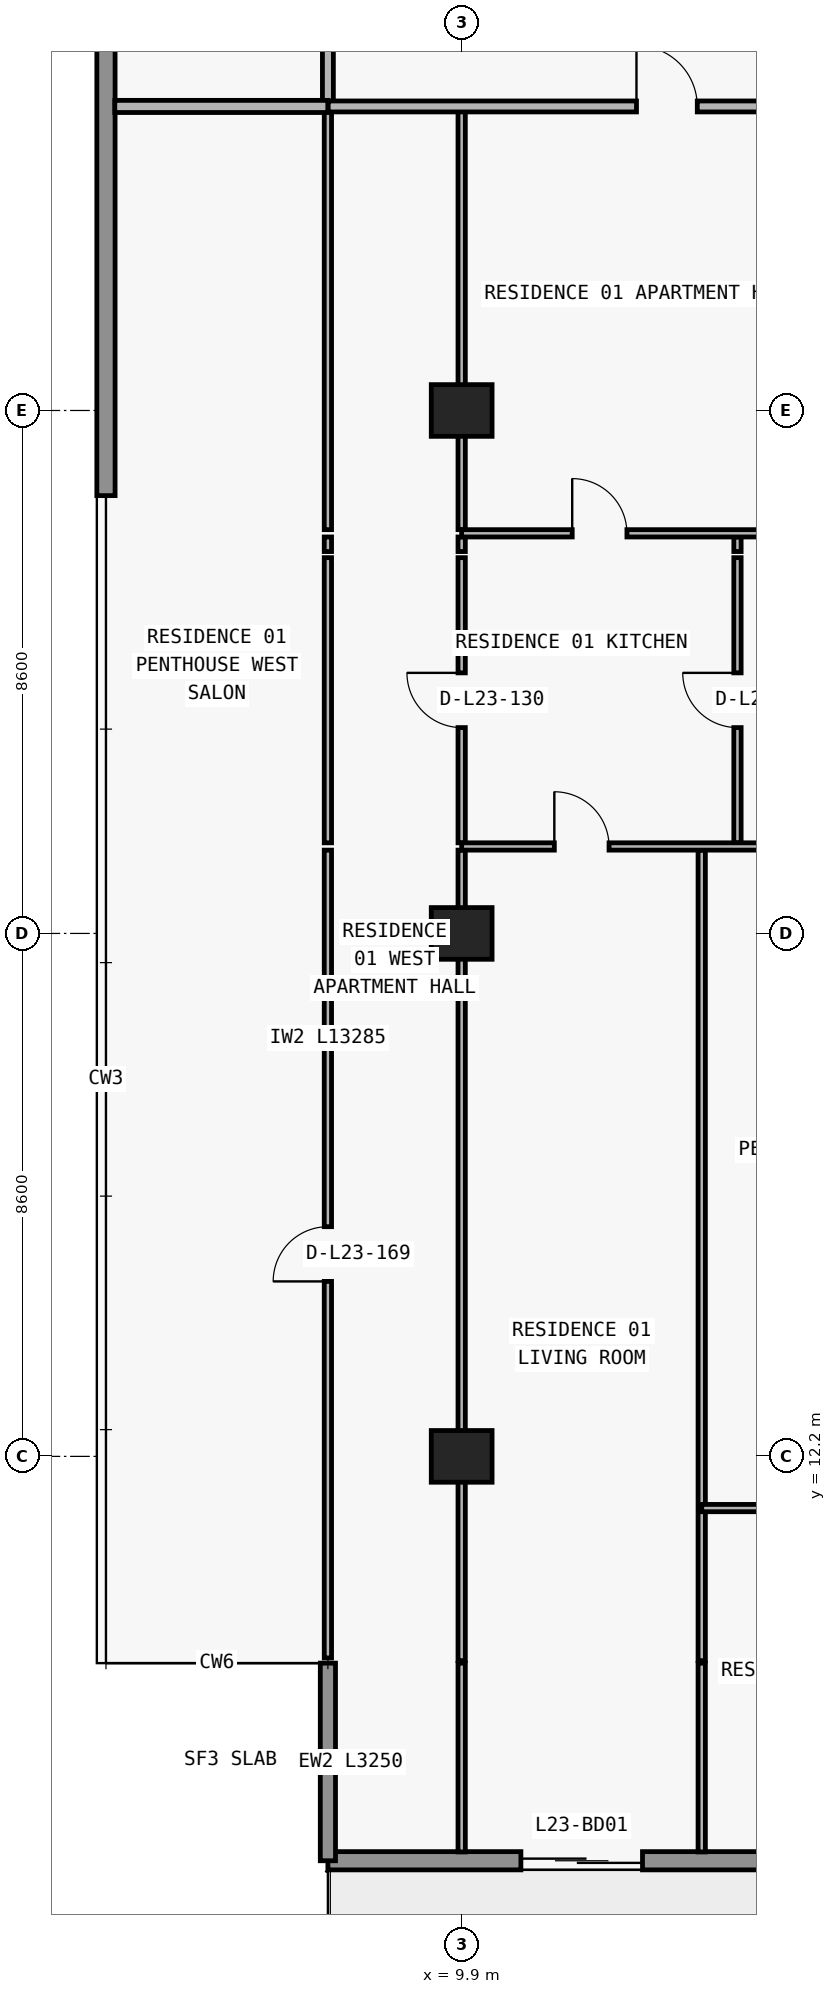
"""IFC4 building model, lengths in metres.
Left out: names, types, materials, properties, quantities, classifications, styles, units other than length and angle.
Written with IfcOpenShell. Run it as: python <this file> out.ifc"""

import sys

from ifc_helpers import new_model, si_unit, direction, frame, frame_2d, origin, origin_2d, place, context, subcontext, project, spatial, rectangle, extrude, element, fill, save


model = new_model("IFC4")
c1 = context("Model", 3, precision=1e-05, world=origin(), true_north=direction((0.0, 1.0)))
c2 = subcontext(c1, "Body", "Model", "MODEL_VIEW")
j1 = project(units=[si_unit("LENGTHUNIT", "METRE"), si_unit("PLANEANGLEUNIT", "RADIAN")], contexts=[c1])
p1 = place(None, origin())
s1 = spatial("IfcSite", under=j1, at=p1, CompositionType="ELEMENT")
p2 = place(p1, origin())
s2 = spatial("IfcBuilding", under=s1, at=p2, CompositionType="ELEMENT")
p3 = place(p2, frame((0.0, 0.0, 87.9)))
s3 = spatial("IfcBuildingStorey", under=s2, at=p3, CompositionType="ELEMENT", Elevation=87.9)
for number, where, z_axis, x_axis in (
    (1, (9.9, 12.2, 0.0), (0.0, 0.0, 1.0), (1.0, 0.0, 0.0)),
    (2, (9.9, 20.8, 0.0), (0.0, 0.0, 1.0), (1.0, 0.0, 0.0)),
    (3, (9.9, 29.4, 0.0), (0.0, 0.0, 1.0), (1.0, 0.0, 0.0)),
):
    element("IfcColumn", number, at=place(p3, frame(where, z_axis=z_axis, x_axis=x_axis)), inside=s3, PredefinedType="COLUMN", context=c2, shape_type="SweptSolid", body=[
        extrude(rectangle(XDim=1.0, YDim=0.85, at=origin_2d()), origin(), (0.0, 0.0, 1.0), 3.05),
    ])
p4 = place(p3, frame((70.1, 5.55, 0.0), z_axis=(0.0, 0.0, 1.0), x_axis=(-1.0, 0.0, 0.0)))
e4 = element("IfcWall", 4, at=p4, inside=s3, PredefinedType="STANDARD", context=c2, shape_type="SweptSolid", body=[
    extrude(rectangle(XDim=62.4, YDim=0.3, at=frame_2d((31.2, 0.0))), origin(), (0.0, 0.0, 1.0), 3.05),
])
p5 = place(p4, frame((57.226, 0.0, 0.0)))
e5 = element("IfcOpeningElement", 5, at=p5, cuts=e4, PredefinedType="OPENING", context=c2, shape_type="SweptSolid", body=[
    extrude(rectangle(XDim=2.0, YDim=2.3, at=frame_2d((1.0, 1.15))), frame((0.0, 0.16, 0.0), z_axis=(0.0, -1.0, 0.0), x_axis=(1.0, 0.0, 0.0)), (0.0, 0.0, 1.0), 0.32),
])
p6 = place(p4, frame((52.926, 0.0, 0.85)))
e6 = element("IfcOpeningElement", 6, at=p6, cuts=e4, PredefinedType="OPENING", context=c2, shape_type="SweptSolid", body=[
    extrude(rectangle(XDim=2.2, YDim=1.55, at=frame_2d((1.1, 0.775))), frame((0.0, 0.16, 0.0), z_axis=(0.0, -1.0, 0.0), x_axis=(1.0, 0.0, 0.0)), (0.0, 0.0, 1.0), 0.32),
])
p7 = place(p4, frame((48.49, 0.0, 0.0)))
e7 = element("IfcOpeningElement", 7, at=p7, cuts=e4, PredefinedType="OPENING", context=c2, shape_type="SweptSolid", body=[
    extrude(rectangle(XDim=2.0, YDim=2.3, at=frame_2d((1.0, 1.15))), frame((0.0, 0.16, 0.0), z_axis=(0.0, -1.0, 0.0), x_axis=(1.0, 0.0, 0.0)), (0.0, 0.0, 1.0), 0.32),
])
p8 = place(p4, frame((44.39, 0.0, 0.85)))
e8 = element("IfcOpeningElement", 8, at=p8, cuts=e4, PredefinedType="OPENING", context=c2, shape_type="SweptSolid", body=[
    extrude(rectangle(XDim=1.8, YDim=1.55, at=frame_2d((0.9, 0.775))), frame((0.0, 0.16, 0.0), z_axis=(0.0, -1.0, 0.0), x_axis=(1.0, 0.0, 0.0)), (0.0, 0.0, 1.0), 0.32),
])
p9 = place(p4, frame((40.426, 0.0, 0.0)))
e9 = element("IfcOpeningElement", 9, at=p9, cuts=e4, PredefinedType="OPENING", context=c2, shape_type="SweptSolid", body=[
    extrude(rectangle(XDim=2.0, YDim=2.3, at=frame_2d((1.0, 1.15))), frame((0.0, 0.16, 0.0), z_axis=(0.0, -1.0, 0.0), x_axis=(1.0, 0.0, 0.0)), (0.0, 0.0, 1.0), 0.32),
])
p10 = place(p4, frame((36.126, 0.0, 0.85)))
e10 = element("IfcOpeningElement", 10, at=p10, cuts=e4, PredefinedType="OPENING", context=c2, shape_type="SweptSolid", body=[
    extrude(rectangle(XDim=2.2, YDim=1.55, at=frame_2d((1.1, 0.775))), frame((0.0, 0.16, 0.0), z_axis=(0.0, -1.0, 0.0), x_axis=(1.0, 0.0, 0.0)), (0.0, 0.0, 1.0), 0.32),
])
p11 = place(p4, frame((32.09, 0.0, 0.0)))
e11 = element("IfcOpeningElement", 11, at=p11, cuts=e4, PredefinedType="OPENING", context=c2, shape_type="SweptSolid", body=[
    extrude(rectangle(XDim=2.0, YDim=2.3, at=frame_2d((1.0, 1.15))), frame((0.0, 0.16, 0.0), z_axis=(0.0, -1.0, 0.0), x_axis=(1.0, 0.0, 0.0)), (0.0, 0.0, 1.0), 0.32),
])
p12 = place(p4, frame((28.21, 0.0, 0.65)))
e12 = element("IfcOpeningElement", 12, at=p12, cuts=e4, PredefinedType="OPENING", context=c2, shape_type="SweptSolid", body=[
    extrude(rectangle(XDim=2.6, YDim=1.85, at=frame_2d((1.3, 0.925))), frame((0.0, 0.16, 0.0), z_axis=(0.0, -1.0, 0.0), x_axis=(1.0, 0.0, 0.0)), (0.0, 0.0, 1.0), 0.32),
])
p13 = place(p4, frame((22.1, 0.0, 0.85)))
e13 = element("IfcOpeningElement", 13, at=p13, cuts=e4, PredefinedType="OPENING", context=c2, shape_type="SweptSolid", body=[
    extrude(rectangle(XDim=2.2, YDim=1.55, at=frame_2d((1.1, 0.775))), frame((0.0, 0.16, 0.0), z_axis=(0.0, -1.0, 0.0), x_axis=(1.0, 0.0, 0.0)), (0.0, 0.0, 1.0), 0.32),
])
p14 = place(p4, frame((16.026, 0.0, 0.0)))
e14 = element("IfcOpeningElement", 14, at=p14, cuts=e4, PredefinedType="OPENING", context=c2, shape_type="SweptSolid", body=[
    extrude(rectangle(XDim=2.0, YDim=2.3, at=frame_2d((1.0, 1.15))), frame((0.0, 0.16, 0.0), z_axis=(0.0, -1.0, 0.0), x_axis=(1.0, 0.0, 0.0)), (0.0, 0.0, 1.0), 0.32),
])
p15 = place(p4, frame((11.726, 0.0, 0.85)))
e15 = element("IfcOpeningElement", 15, at=p15, cuts=e4, PredefinedType="OPENING", context=c2, shape_type="SweptSolid", body=[
    extrude(rectangle(XDim=2.2, YDim=1.55, at=frame_2d((1.1, 0.775))), frame((0.0, 0.16, 0.0), z_axis=(0.0, -1.0, 0.0), x_axis=(1.0, 0.0, 0.0)), (0.0, 0.0, 1.0), 0.32),
])
p16 = place(p4, frame((7.29, 0.0, 0.0)))
e16 = element("IfcOpeningElement", 16, at=p16, cuts=e4, PredefinedType="OPENING", context=c2, shape_type="SweptSolid", body=[
    extrude(rectangle(XDim=2.0, YDim=2.3, at=frame_2d((1.0, 1.15))), frame((0.0, 0.16, 0.0), z_axis=(0.0, -1.0, 0.0), x_axis=(1.0, 0.0, 0.0)), (0.0, 0.0, 1.0), 0.32),
])
p17 = place(p4, frame((3.19, 0.0, 0.85)))
e17 = element("IfcOpeningElement", 17, at=p17, cuts=e4, PredefinedType="OPENING", context=c2, shape_type="SweptSolid", body=[
    extrude(rectangle(XDim=1.8, YDim=1.55, at=frame_2d((0.9, 0.775))), frame((0.0, 0.16, 0.0), z_axis=(0.0, -1.0, 0.0), x_axis=(1.0, 0.0, 0.0)), (0.0, 0.0, 1.0), 0.32),
])
p18 = place(p3, frame((7.7, 8.8, 0.0), z_axis=(0.0, 0.0, 1.0), x_axis=(0.0, -1.0, 0.0)))
e18 = element("IfcWall", 18, at=p18, inside=s3, PredefinedType="ELEMENTEDWALL", context=c2, shape_type="SweptSolid", body=[
    extrude(rectangle(XDim=3.25, YDim=0.25, at=frame_2d((1.625, 0.0))), origin(), (0.0, 0.0, 1.0), 3.05),
])
p19 = place(p3, frame((4.05, 28.0, 0.0), z_axis=(0.0, 0.0, 1.0), x_axis=(0.0, 1.0, 0.0)))
e19 = element("IfcWall", 19, at=p19, inside=s3, PredefinedType="STANDARD", context=c2, shape_type="SweptSolid", body=[
    extrude(rectangle(XDim=19.2, YDim=0.3, at=frame_2d((9.6, 0.0))), origin(), (0.0, 0.0, 1.0), 3.05),
])
p20 = place(p3, frame((7.7, 8.885, 0.0), z_axis=(0.0, 0.0, 1.0), x_axis=(0.0, 1.0, 0.0)))
e20 = element("IfcWall", 20, at=p20, inside=s3, PredefinedType="PARTITIONING", context=c2, shape_type="SweptSolid", body=[
    extrude(rectangle(XDim=13.285, YDim=0.12, at=frame_2d((6.643, 0.0))), origin(), (0.0, 0.0, 1.0), 3.05),
])
p21 = place(p20, frame((6.192, 0.0, 0.0)))
e21 = element("IfcOpeningElement", 21, at=p21, cuts=e20, PredefinedType="OPENING", context=c2, shape_type="SweptSolid", body=[
    extrude(rectangle(XDim=0.9, YDim=2.15, at=frame_2d((0.45, 1.075))), frame((0.0, 0.07, 0.0), z_axis=(0.0, -1.0, 0.0), x_axis=(1.0, 0.0, 0.0)), (0.0, 0.0, 1.0), 0.14),
])
p22 = place(p3, frame((7.7, 22.29, 0.0), z_axis=(0.0, 0.0, 1.0), x_axis=(0.0, 1.0, 0.0)))
e22 = element("IfcWall", 22, at=p22, inside=s3, PredefinedType="PARTITIONING", context=c2, shape_type="SweptSolid", body=[
    extrude(rectangle(XDim=4.69, YDim=0.12, at=frame_2d((2.345, 0.0))), origin(), (0.0, 0.0, 1.0), 3.05),
])
p23 = place(p3, frame((7.7, 27.08, 0.0), z_axis=(0.0, 0.0, 1.0), x_axis=(0.0, 1.0, 0.0)))
e23 = element("IfcWall", 23, at=p23, inside=s3, PredefinedType="PARTITIONING", context=c2, shape_type="SweptSolid", body=[
    extrude(rectangle(XDim=0.24, YDim=0.12, at=frame_2d((0.12, 0.0))), origin(), (0.0, 0.0, 1.0), 3.05),
])
p24 = place(p3, frame((7.7, 27.44, 0.0), z_axis=(0.0, 0.0, 1.0), x_axis=(0.0, 1.0, 0.0)))
e24 = element("IfcWall", 24, at=p24, inside=s3, PredefinedType="PARTITIONING", context=c2, shape_type="SweptSolid", body=[
    extrude(rectangle(XDim=6.96, YDim=0.12, at=frame_2d((3.48, 0.0))), origin(), (0.0, 0.0, 1.0), 3.05),
])
p25 = place(p3, frame((7.7, 34.405, 0.0), z_axis=(0.0, 0.0, 1.0), x_axis=(0.0, 1.0, 0.0)))
e25 = element("IfcWall", 25, at=p25, inside=s3, PredefinedType="PARTITIONING", context=c2, shape_type="SweptSolid", body=[
    extrude(rectangle(XDim=2.545, YDim=0.18, at=frame_2d((1.272, 0.0))), origin(), (0.0, 0.0, 1.0), 3.05),
])
p26 = place(p3, frame((9.9, 5.695, 0.0), z_axis=(0.0, 0.0, 1.0), x_axis=(0.0, 1.0, 0.0)))
e26 = element("IfcWall", 26, at=p26, inside=s3, PredefinedType="PARTITIONING", context=c2, shape_type="SweptSolid", body=[
    extrude(rectangle(XDim=3.105, YDim=0.12, at=frame_2d((1.552, 0.0))), origin(), (0.0, 0.0, 1.0), 3.05),
])
p27 = place(p3, frame((9.9, 8.84, 0.0), z_axis=(0.0, 0.0, 1.0), x_axis=(0.0, 1.0, 0.0)))
e27 = element("IfcWall", 27, at=p27, inside=s3, PredefinedType="PARTITIONING", context=c2, shape_type="SweptSolid", body=[
    extrude(rectangle(XDim=13.33, YDim=0.12, at=frame_2d((6.665, 0.0))), origin(), (0.0, 0.0, 1.0), 2.174),
])
p28 = place(p3, frame((9.9, 22.29, 0.0), z_axis=(0.0, 0.0, 1.0), x_axis=(0.0, 1.0, 0.0)))
e28 = element("IfcWall", 28, at=p28, inside=s3, PredefinedType="PARTITIONING", context=c2, shape_type="SweptSolid", body=[
    extrude(rectangle(XDim=4.69, YDim=0.12, at=frame_2d((2.345, 0.0))), origin(), (0.0, 0.0, 1.0), 2.174),
])
p29 = place(p28, frame((1.895, 0.0, 0.0)))
e29 = element("IfcOpeningElement", 29, at=p29, cuts=e28, PredefinedType="OPENING", context=c2, shape_type="SweptSolid", body=[
    extrude(rectangle(XDim=0.9, YDim=2.124, at=frame_2d((0.45, 1.062))), frame((0.0, 0.07, 0.0), z_axis=(0.0, -1.0, 0.0), x_axis=(1.0, 0.0, 0.0)), (0.0, 0.0, 1.0), 0.14),
])
p30 = place(p3, frame((9.9, 27.08, 0.0), z_axis=(0.0, 0.0, 1.0), x_axis=(0.0, 1.0, 0.0)))
e30 = element("IfcWall", 30, at=p30, inside=s3, PredefinedType="PARTITIONING", context=c2, shape_type="SweptSolid", body=[
    extrude(rectangle(XDim=0.24, YDim=0.12, at=frame_2d((0.12, 0.0))), origin(), (0.0, 0.0, 1.0), 2.174),
])
p31 = place(p3, frame((9.9, 27.44, 0.0), z_axis=(0.0, 0.0, 1.0), x_axis=(0.0, 1.0, 0.0)))
e31 = element("IfcWall", 31, at=p31, inside=s3, PredefinedType="PARTITIONING", context=c2, shape_type="SweptSolid", body=[
    extrude(rectangle(XDim=6.96, YDim=0.12, at=frame_2d((3.48, 0.0))), origin(), (0.0, 0.0, 1.0), 2.174),
])
p32 = place(p3, frame((13.848, 5.695, 0.0), z_axis=(0.0, 0.0, 1.0), x_axis=(0.0, 1.0, 0.0)))
e32 = element("IfcWall", 32, at=p32, inside=s3, PredefinedType="PARTITIONING", context=c2, shape_type="SweptSolid", body=[
    extrude(rectangle(XDim=3.105, YDim=0.12, at=frame_2d((1.552, 0.0))), origin(), (0.0, 0.0, 1.0), 3.05),
])
p33 = place(p3, frame((13.848, 8.84, 0.0), z_axis=(0.0, 0.0, 1.0), x_axis=(0.0, 1.0, 0.0)))
e33 = element("IfcWall", 33, at=p33, inside=s3, PredefinedType="PARTITIONING", context=c2, shape_type="SweptSolid", body=[
    extrude(rectangle(XDim=13.33, YDim=0.12, at=frame_2d((6.665, 0.0))), origin(), (0.0, 0.0, 1.0), 3.05),
])
p34 = place(p3, frame((14.436, 22.29, 0.0), z_axis=(0.0, 0.0, 1.0), x_axis=(0.0, 1.0, 0.0)))
e34 = element("IfcWall", 34, at=p34, inside=s3, PredefinedType="PARTITIONING", context=c2, shape_type="SweptSolid", body=[
    extrude(rectangle(XDim=4.69, YDim=0.12, at=frame_2d((2.345, 0.0))), origin(), (0.0, 0.0, 1.0), 3.05),
])
p35 = place(p34, frame((1.895, 0.0, 0.0)))
e35 = element("IfcOpeningElement", 35, at=p35, cuts=e34, PredefinedType="OPENING", context=c2, shape_type="SweptSolid", body=[
    extrude(rectangle(XDim=0.9, YDim=2.15, at=frame_2d((0.45, 1.075))), frame((0.0, 0.07, 0.0), z_axis=(0.0, -1.0, 0.0), x_axis=(1.0, 0.0, 0.0)), (0.0, 0.0, 1.0), 0.14),
])
p36 = place(p3, frame((14.436, 27.08, 0.0), z_axis=(0.0, 0.0, 1.0), x_axis=(0.0, 1.0, 0.0)))
e36 = element("IfcWall", 36, at=p36, inside=s3, PredefinedType="PARTITIONING", context=c2, shape_type="SweptSolid", body=[
    extrude(rectangle(XDim=0.24, YDim=0.12, at=frame_2d((0.12, 0.0))), origin(), (0.0, 0.0, 1.0), 3.05),
])
p37 = place(p3, frame((13.848, 11.35, 0.0), z_axis=(0.0, 0.0, 1.0), x_axis=(1.0, 0.0, 0.0)))
e37 = element("IfcWall", 37, at=p37, inside=s3, PredefinedType="PARTITIONING", context=c2, shape_type="SweptSolid", body=[
    extrude(rectangle(XDim=4.402, YDim=0.12, at=frame_2d((2.201, 0.0))), origin(), (0.0, 0.0, 1.0), 3.05),
])
p38 = place(p37, frame((1.751, 0.0, 0.0)))
e38 = element("IfcOpeningElement", 38, at=p38, cuts=e37, PredefinedType="OPENING", context=c2, shape_type="SweptSolid", body=[
    extrude(rectangle(XDim=0.9, YDim=2.15, at=frame_2d((0.45, 1.075))), frame((0.0, 0.07, 0.0), z_axis=(0.0, -1.0, 0.0), x_axis=(1.0, 0.0, 0.0)), (0.0, 0.0, 1.0), 0.14),
])
p39 = place(p3, frame((9.9, 22.23, 0.0), z_axis=(0.0, 0.0, 1.0), x_axis=(1.0, 0.0, 0.0)))
e39 = element("IfcWall", 39, at=p39, inside=s3, PredefinedType="PARTITIONING", context=c2, shape_type="SweptSolid", body=[
    extrude(rectangle(XDim=8.35, YDim=0.12, at=frame_2d((4.175, 0.0))), origin(), (0.0, 0.0, 1.0), 3.05),
])
p40 = place(p39, frame((1.524, 0.0, 0.0)))
e40 = element("IfcOpeningElement", 40, at=p40, cuts=e39, PredefinedType="OPENING", context=c2, shape_type="SweptSolid", body=[
    extrude(rectangle(XDim=0.9, YDim=2.15, at=frame_2d((0.45, 1.075))), frame((0.0, 0.07, 0.0), z_axis=(0.0, -1.0, 0.0), x_axis=(1.0, 0.0, 0.0)), (0.0, 0.0, 1.0), 0.14),
])
p41 = place(p39, frame((5.993, 0.0, 0.0)))
e41 = element("IfcOpeningElement", 41, at=p41, cuts=e39, PredefinedType="OPENING", context=c2, shape_type="SweptSolid", body=[
    extrude(rectangle(XDim=0.9, YDim=2.15, at=frame_2d((0.45, 1.075))), frame((0.0, 0.07, 0.0), z_axis=(0.0, -1.0, 0.0), x_axis=(1.0, 0.0, 0.0)), (0.0, 0.0, 1.0), 0.14),
])
p42 = place(p3, frame((9.9, 27.38, 0.0), z_axis=(0.0, 0.0, 1.0), x_axis=(1.0, 0.0, 0.0)))
e42 = element("IfcWall", 42, at=p42, inside=s3, PredefinedType="PARTITIONING", context=c2, shape_type="SweptSolid", body=[
    extrude(rectangle(XDim=8.35, YDim=0.12, at=frame_2d((4.175, 0.0))), origin(), (0.0, 0.0, 1.0), 3.05),
])
p43 = place(p42, frame((1.818, 0.0, 0.0)))
e43 = element("IfcOpeningElement", 43, at=p43, cuts=e42, PredefinedType="OPENING", context=c2, shape_type="SweptSolid", body=[
    extrude(rectangle(XDim=0.9, YDim=2.15, at=frame_2d((0.45, 1.075))), frame((0.0, 0.07, 0.0), z_axis=(0.0, -1.0, 0.0), x_axis=(1.0, 0.0, 0.0)), (0.0, 0.0, 1.0), 0.14),
])
p44 = place(p3, frame((4.195, 34.4, 0.0), z_axis=(0.0, 0.0, 1.0), x_axis=(1.0, 0.0, 0.0)))
e44 = element("IfcWall", 44, at=p44, inside=s3, PredefinedType="PARTITIONING", context=c2, shape_type="SweptSolid", body=[
    extrude(rectangle(XDim=3.505, YDim=0.2, at=frame_2d((1.752, 0.0))), origin(), (0.0, 0.0, 1.0), 3.05),
])
p45 = place(p3, frame((7.705, 34.4, 0.0), z_axis=(0.0, 0.0, 1.0), x_axis=(1.0, 0.0, 0.0)))
e45 = element("IfcWall", 45, at=p45, inside=s3, PredefinedType="PARTITIONING", context=c2, shape_type="SweptSolid", body=[
    extrude(rectangle(XDim=10.545, YDim=0.18, at=frame_2d((5.272, 0.0))), origin(), (0.0, 0.0, 1.0), 3.05),
])
p46 = place(p45, frame((5.07, 0.0, 0.0)))
e46 = element("IfcOpeningElement", 46, at=p46, cuts=e45, PredefinedType="OPENING", context=c2, shape_type="SweptSolid", body=[
    extrude(rectangle(XDim=1.0, YDim=2.2, at=frame_2d((0.5, 1.1))), frame((0.0, 0.1, 0.0), z_axis=(0.0, -1.0, 0.0), x_axis=(1.0, 0.0, 0.0)), (0.0, 0.0, 1.0), 0.2),
])
p47 = place(p5, origin())
e47 = element("IfcDoor", 47, at=p47, inside=s3, OperationType="DOUBLE_DOOR_SLIDING", PredefinedType="DOOR", context=c2, shape_type="SweptSolid", body=[
    extrude(rectangle(XDim=2.0, YDim=2.3, at=frame_2d((1.0, 1.15))), frame((0.0, 0.025, 0.0), z_axis=(0.0, -1.0, 0.0), x_axis=(1.0, 0.0, 0.0)), (0.0, 0.0, 1.0), 0.05),
])
fill(e5, e47)
p48 = place(p46, origin())
e48 = element("IfcDoor", 48, at=p48, inside=s3, OperationType="SINGLE_SWING_LEFT", PredefinedType="DOOR", context=c2, shape_type="SweptSolid", body=[
    extrude(rectangle(XDim=1.0, YDim=2.2, at=frame_2d((0.5, 1.1))), frame((0.0, 0.025, 0.0), z_axis=(0.0, -1.0, 0.0), x_axis=(1.0, 0.0, 0.0)), (0.0, 0.0, 1.0), 0.05),
])
fill(e46, e48)
p49 = place(p43, origin())
e49 = element("IfcDoor", 49, at=p49, inside=s3, OperationType="SINGLE_SWING_LEFT", PredefinedType="DOOR", context=c2, shape_type="SweptSolid", body=[
    extrude(rectangle(XDim=0.9, YDim=2.15, at=frame_2d((0.45, 1.075))), frame((0.0, 0.025, 0.0), z_axis=(0.0, -1.0, 0.0), x_axis=(1.0, 0.0, 0.0)), (0.0, 0.0, 1.0), 0.05),
])
fill(e43, e49)
p50 = place(p35, origin())
e50 = element("IfcDoor", 50, at=p50, inside=s3, OperationType="SINGLE_SWING_RIGHT", PredefinedType="DOOR", context=c2, shape_type="SweptSolid", body=[
    extrude(rectangle(XDim=0.9, YDim=2.15, at=frame_2d((0.45, 1.075))), frame((0.0, 0.025, 0.0), z_axis=(0.0, -1.0, 0.0), x_axis=(1.0, 0.0, 0.0)), (0.0, 0.0, 1.0), 0.05),
])
fill(e35, e50)
p51 = place(p40, origin())
e51 = element("IfcDoor", 51, at=p51, inside=s3, OperationType="SINGLE_SWING_LEFT", PredefinedType="DOOR", context=c2, shape_type="SweptSolid", body=[
    extrude(rectangle(XDim=0.9, YDim=2.15, at=frame_2d((0.45, 1.075))), frame((0.0, 0.025, 0.0), z_axis=(0.0, -1.0, 0.0), x_axis=(1.0, 0.0, 0.0)), (0.0, 0.0, 1.0), 0.05),
])
fill(e40, e51)
p52 = place(p29, origin())
e52 = element("IfcDoor", 52, at=p52, inside=s3, OperationType="SINGLE_SWING_RIGHT", PredefinedType="DOOR", context=c2, shape_type="SweptSolid", body=[
    extrude(rectangle(XDim=0.9, YDim=2.124, at=frame_2d((0.45, 1.062))), frame((0.0, 0.025, 0.0), z_axis=(0.0, -1.0, 0.0), x_axis=(1.0, 0.0, 0.0)), (0.0, 0.0, 1.0), 0.05),
])
fill(e29, e52)
p53 = place(p21, origin())
e53 = element("IfcDoor", 53, at=p53, inside=s3, OperationType="SINGLE_SWING_LEFT", PredefinedType="DOOR", context=c2, shape_type="SweptSolid", body=[
    extrude(rectangle(XDim=0.9, YDim=2.15, at=frame_2d((0.45, 1.075))), frame((0.0, 0.025, 0.0), z_axis=(0.0, -1.0, 0.0), x_axis=(1.0, 0.0, 0.0)), (0.0, 0.0, 1.0), 0.05),
])
fill(e21, e53)
save(model, sys.argv[1])
